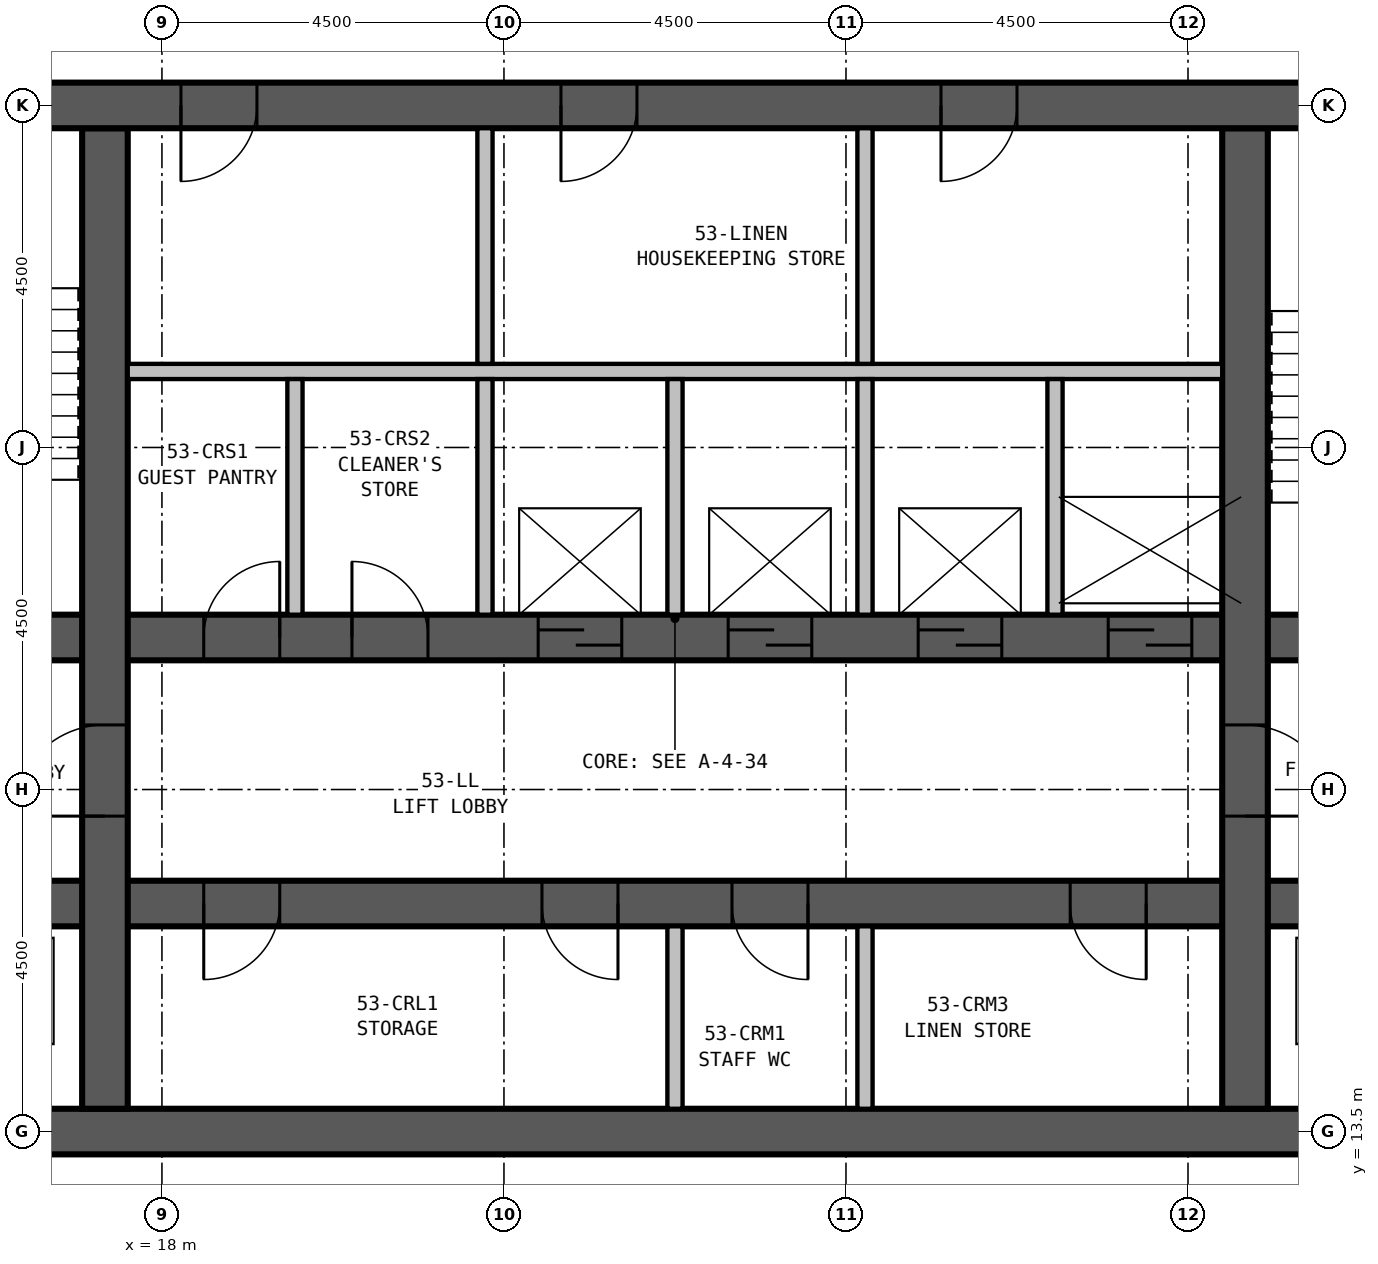
"""IFC4 building model, lengths in metres.
Left out: names, types, materials, properties, quantities, classifications, styles, units other than length and angle.
Written with IfcOpenShell. Run it as: python <this file> out.ifc"""

import sys

from ifc_helpers import new_model, si_unit, direction, frame, frame_2d, origin, place, context, subcontext, project, spatial, rectangle, extrude, element, fill, save


model = new_model("IFC4")
c1 = context("Model", 3, precision=1e-05, world=origin(), true_north=direction((0.0, 1.0)))
c2 = subcontext(c1, "Body", "Model", "MODEL_VIEW")
j1 = project(units=[si_unit("LENGTHUNIT", "METRE"), si_unit("PLANEANGLEUNIT", "RADIAN")], contexts=[c1])
p1 = place(None, origin())
s1 = spatial("IfcSite", under=j1, at=p1, CompositionType="ELEMENT")
p2 = place(p1, origin())
s2 = spatial("IfcBuilding", under=s1, at=p2, CompositionType="ELEMENT")
p3 = place(p2, frame((0.0, 0.0, 204.4)))
s3 = spatial("IfcBuildingStorey", under=s2, at=p3, CompositionType="ELEMENT", Elevation=204.4)
p4 = place(p3, frame((13.2, 13.5, 0.0), z_axis=(0.0, 0.0, 1.0), x_axis=(1.0, 0.0, 0.0)))
e1 = element("IfcWall", 1, at=p4, inside=s3, PredefinedType="SHEAR", context=c2, shape_type="SweptSolid", body=[
    extrude(rectangle(XDim=23.1, YDim=0.6, at=frame_2d((11.55, 0.0))), origin(), (0.0, 0.0, 1.0), 3.5),
])
p5 = place(p3, frame((36.3, 27.0, 0.0), z_axis=(0.0, 0.0, 1.0), x_axis=(-1.0, 0.0, 0.0)))
e2 = element("IfcWall", 2, at=p5, inside=s3, PredefinedType="SHEAR", context=c2, shape_type="SweptSolid", body=[
    extrude(rectangle(XDim=23.1, YDim=0.6, at=frame_2d((11.55, 0.0))), origin(), (0.0, 0.0, 1.0), 3.5),
])
p6 = place(p5, frame((17.05, 0.0, 0.0)))
e3 = element("IfcOpeningElement", 3, at=p6, cuts=e2, PredefinedType="OPENING", context=c2, shape_type="SweptSolid", body=[
    extrude(rectangle(XDim=1.0, YDim=2.1, at=frame_2d((0.5, 1.05))), frame((0.0, 0.31, 0.0), z_axis=(0.0, -1.0, 0.0), x_axis=(1.0, 0.0, 0.0)), (0.0, 0.0, 1.0), 0.62),
])
p7 = place(p5, frame((12.05, 0.0, 0.0)))
e4 = element("IfcOpeningElement", 4, at=p7, cuts=e2, PredefinedType="OPENING", context=c2, shape_type="SweptSolid", body=[
    extrude(rectangle(XDim=1.0, YDim=2.1, at=frame_2d((0.5, 1.05))), frame((0.0, 0.31, 0.0), z_axis=(0.0, -1.0, 0.0), x_axis=(1.0, 0.0, 0.0)), (0.0, 0.0, 1.0), 0.62),
])
p8 = place(p5, frame((7.05, 0.0, 0.0)))
e5 = element("IfcOpeningElement", 5, at=p8, cuts=e2, PredefinedType="OPENING", context=c2, shape_type="SweptSolid", body=[
    extrude(rectangle(XDim=1.0, YDim=2.1, at=frame_2d((0.5, 1.05))), frame((0.0, 0.31, 0.0), z_axis=(0.0, -1.0, 0.0), x_axis=(1.0, 0.0, 0.0)), (0.0, 0.0, 1.0), 0.62),
])
p9 = place(p3, frame((17.25, 13.8, 0.0), z_axis=(0.0, 0.0, 1.0), x_axis=(0.0, 1.0, 0.0)))
e6 = element("IfcWall", 6, at=p9, inside=s3, PredefinedType="SHEAR", context=c2, shape_type="SweptSolid", body=[
    extrude(rectangle(XDim=12.9, YDim=0.6, at=frame_2d((6.45, 0.0))), origin(), (0.0, 0.0, 1.0), 3.5),
])
p10 = place(p9, frame((3.85, 0.0, 0.0)))
e7 = element("IfcOpeningElement", 7, at=p10, cuts=e6, PredefinedType="OPENING", context=c2, shape_type="SweptSolid", body=[
    extrude(rectangle(XDim=1.2, YDim=2.1, at=frame_2d((0.6, 1.05))), frame((0.0, 0.31, 0.0), z_axis=(0.0, -1.0, 0.0), x_axis=(1.0, 0.0, 0.0)), (0.0, 0.0, 1.0), 0.62),
])
p11 = place(p3, frame((32.25, 13.8, 0.0), z_axis=(0.0, 0.0, 1.0), x_axis=(0.0, 1.0, 0.0)))
e8 = element("IfcWall", 8, at=p11, inside=s3, PredefinedType="SHEAR", context=c2, shape_type="SweptSolid", body=[
    extrude(rectangle(XDim=12.9, YDim=0.6, at=frame_2d((6.45, 0.0))), origin(), (0.0, 0.0, 1.0), 3.5),
])
p12 = place(p11, frame((5.05, 0.0, 0.0), z_axis=(0.0, 0.0, 1.0), x_axis=(-1.0, 0.0, 0.0)))
e9 = element("IfcOpeningElement", 9, at=p12, cuts=e8, PredefinedType="OPENING", context=c2, shape_type="SweptSolid", body=[
    extrude(rectangle(XDim=1.2, YDim=2.1, at=frame_2d((0.6, 1.05))), frame((0.0, 0.31, 0.0), z_axis=(0.0, -1.0, 0.0), x_axis=(1.0, 0.0, 0.0)), (0.0, 0.0, 1.0), 0.62),
])
p13 = place(p3, frame((13.8, 16.5, 0.0), z_axis=(0.0, 0.0, 1.0), x_axis=(1.0, 0.0, 0.0)))
e10 = element("IfcWall", 10, at=p13, inside=s3, PredefinedType="SHEAR", context=c2, shape_type="SweptSolid", body=[
    extrude(rectangle(XDim=21.9, YDim=0.6, at=frame_2d((10.95, 0.0))), origin(), (0.0, 0.0, 1.0), 3.5),
])
p14 = place(p13, frame((5.75, 0.0, 0.0), z_axis=(0.0, 0.0, 1.0), x_axis=(-1.0, 0.0, 0.0)))
e11 = element("IfcOpeningElement", 11, at=p14, cuts=e10, PredefinedType="OPENING", context=c2, shape_type="SweptSolid", body=[
    extrude(rectangle(XDim=1.0, YDim=2.1, at=frame_2d((0.5, 1.05))), frame((0.0, 0.31, 0.0), z_axis=(0.0, -1.0, 0.0), x_axis=(1.0, 0.0, 0.0)), (0.0, 0.0, 1.0), 0.62),
])
p15 = place(p13, frame((10.2, 0.0, 0.0), z_axis=(0.0, 0.0, 1.0), x_axis=(-1.0, 0.0, 0.0)))
e12 = element("IfcOpeningElement", 12, at=p15, cuts=e10, PredefinedType="OPENING", context=c2, shape_type="SweptSolid", body=[
    extrude(rectangle(XDim=1.0, YDim=2.1, at=frame_2d((0.5, 1.05))), frame((0.0, 0.31, 0.0), z_axis=(0.0, -1.0, 0.0), x_axis=(1.0, 0.0, 0.0)), (0.0, 0.0, 1.0), 0.62),
])
p16 = place(p13, frame((12.7, 0.0, 0.0), z_axis=(0.0, 0.0, 1.0), x_axis=(-1.0, 0.0, 0.0)))
e13 = element("IfcOpeningElement", 13, at=p16, cuts=e10, PredefinedType="OPENING", context=c2, shape_type="SweptSolid", body=[
    extrude(rectangle(XDim=1.0, YDim=2.1, at=frame_2d((0.5, 1.05))), frame((0.0, 0.31, 0.0), z_axis=(0.0, -1.0, 0.0), x_axis=(1.0, 0.0, 0.0)), (0.0, 0.0, 1.0), 0.62),
])
p17 = place(p13, frame((17.15, 0.0, 0.0), z_axis=(0.0, 0.0, 1.0), x_axis=(-1.0, 0.0, 0.0)))
e14 = element("IfcOpeningElement", 14, at=p17, cuts=e10, PredefinedType="OPENING", context=c2, shape_type="SweptSolid", body=[
    extrude(rectangle(XDim=1.0, YDim=2.1, at=frame_2d((0.5, 1.05))), frame((0.0, 0.31, 0.0), z_axis=(0.0, -1.0, 0.0), x_axis=(1.0, 0.0, 0.0)), (0.0, 0.0, 1.0), 0.62),
])
p18 = place(p13, frame((0.6, 0.0, 0.0)))
e15 = element("IfcOpeningElement", 15, at=p18, cuts=e10, PredefinedType="OPENING", context=c2, shape_type="SweptSolid", body=[
    extrude(rectangle(XDim=1.2, YDim=2.1, at=frame_2d((0.6, 1.05))), frame((0.0, 0.31, 0.0), z_axis=(0.0, -1.0, 0.0), x_axis=(1.0, 0.0, 0.0)), (0.0, 0.0, 1.0), 0.62),
])
p19 = place(p13, frame((19.6, 0.0, 0.0)))
e16 = element("IfcOpeningElement", 16, at=p19, cuts=e10, PredefinedType="OPENING", context=c2, shape_type="SweptSolid", body=[
    extrude(rectangle(XDim=1.2, YDim=2.1, at=frame_2d((0.6, 1.05))), frame((0.0, 0.31, 0.0), z_axis=(0.0, -1.0, 0.0), x_axis=(1.0, 0.0, 0.0)), (0.0, 0.0, 1.0), 0.62),
])
p20 = place(p3, frame((13.8, 20.0, 0.0), z_axis=(0.0, 0.0, 1.0), x_axis=(1.0, 0.0, 0.0)))
e17 = element("IfcWall", 17, at=p20, inside=s3, PredefinedType="SHEAR", context=c2, shape_type="SweptSolid", body=[
    extrude(rectangle(XDim=21.9, YDim=0.6, at=frame_2d((10.95, 0.0))), origin(), (0.0, 0.0, 1.0), 3.5),
])
p21 = place(p20, frame((0.5, 0.0, 0.0)))
e18 = element("IfcOpeningElement", 18, at=p21, cuts=e17, PredefinedType="OPENING", context=c2, shape_type="SweptSolid", body=[
    extrude(rectangle(XDim=1.0, YDim=2.1, at=frame_2d((0.5, 1.05))), frame((0.0, 0.31, 0.0), z_axis=(0.0, -1.0, 0.0), x_axis=(1.0, 0.0, 0.0)), (0.0, 0.0, 1.0), 0.62),
])
p22 = place(p20, frame((20.5, 0.0, 0.0)))
e19 = element("IfcOpeningElement", 19, at=p22, cuts=e17, PredefinedType="OPENING", context=c2, shape_type="SweptSolid", body=[
    extrude(rectangle(XDim=1.0, YDim=2.1, at=frame_2d((0.5, 1.05))), frame((0.0, 0.31, 0.0), z_axis=(0.0, -1.0, 0.0), x_axis=(1.0, 0.0, 0.0)), (0.0, 0.0, 1.0), 0.62),
])
p23 = place(p20, frame((9.15, 0.0, 0.0)))
e20 = element("IfcOpeningElement", 20, at=p23, cuts=e17, PredefinedType="OPENING", context=c2, shape_type="SweptSolid", body=[
    extrude(rectangle(XDim=1.1, YDim=2.1, at=frame_2d((0.55, 1.05))), frame((0.0, 0.31, 0.0), z_axis=(0.0, -1.0, 0.0), x_axis=(1.0, 0.0, 0.0)), (0.0, 0.0, 1.0), 0.62),
])
p24 = place(p20, frame((11.65, 0.0, 0.0)))
e21 = element("IfcOpeningElement", 21, at=p24, cuts=e17, PredefinedType="OPENING", context=c2, shape_type="SweptSolid", body=[
    extrude(rectangle(XDim=1.1, YDim=2.1, at=frame_2d((0.55, 1.05))), frame((0.0, 0.31, 0.0), z_axis=(0.0, -1.0, 0.0), x_axis=(1.0, 0.0, 0.0)), (0.0, 0.0, 1.0), 0.62),
])
p25 = place(p20, frame((14.15, 0.0, 0.0)))
e22 = element("IfcOpeningElement", 22, at=p25, cuts=e17, PredefinedType="OPENING", context=c2, shape_type="SweptSolid", body=[
    extrude(rectangle(XDim=1.1, YDim=2.1, at=frame_2d((0.55, 1.05))), frame((0.0, 0.31, 0.0), z_axis=(0.0, -1.0, 0.0), x_axis=(1.0, 0.0, 0.0)), (0.0, 0.0, 1.0), 0.62),
])
p26 = place(p20, frame((16.65, 0.0, 0.0)))
e23 = element("IfcOpeningElement", 23, at=p26, cuts=e17, PredefinedType="OPENING", context=c2, shape_type="SweptSolid", body=[
    extrude(rectangle(XDim=1.1, YDim=2.1, at=frame_2d((0.55, 1.05))), frame((0.0, 0.31, 0.0), z_axis=(0.0, -1.0, 0.0), x_axis=(1.0, 0.0, 0.0)), (0.0, 0.0, 1.0), 0.62),
])
p27 = place(p20, frame((4.75, 0.0, 0.0)))
e24 = element("IfcOpeningElement", 24, at=p27, cuts=e17, PredefinedType="OPENING", context=c2, shape_type="SweptSolid", body=[
    extrude(rectangle(XDim=1.0, YDim=2.1, at=frame_2d((0.5, 1.05))), frame((0.0, 0.31, 0.0), z_axis=(0.0, -1.0, 0.0), x_axis=(1.0, 0.0, 0.0)), (0.0, 0.0, 1.0), 0.62),
])
p28 = place(p20, frame((6.7, 0.0, 0.0)))
e25 = element("IfcOpeningElement", 25, at=p28, cuts=e17, PredefinedType="OPENING", context=c2, shape_type="SweptSolid", body=[
    extrude(rectangle(XDim=1.0, YDim=2.1, at=frame_2d((0.5, 1.05))), frame((0.0, 0.31, 0.0), z_axis=(0.0, -1.0, 0.0), x_axis=(1.0, 0.0, 0.0)), (0.0, 0.0, 1.0), 0.62),
])
for number, where, z_axis, x_axis in (
    (26, (19.75, 20.3, 0.0), (0.0, 0.0, 1.0), (0.0, 1.0, 0.0)),
    (27, (22.25, 20.3, 0.0), (0.0, 0.0, 1.0), (0.0, 1.0, 0.0)),
):
    element("IfcWall", number, at=place(p3, frame(where, z_axis=z_axis, x_axis=x_axis)), inside=s3, PredefinedType="PARTITIONING", context=c2, shape_type="SweptSolid", body=[
        extrude(rectangle(XDim=3.1, YDim=0.2, at=frame_2d((1.55, 0.0))), origin(), (0.0, 0.0, 1.0), 3.25),
    ])
p29 = place(p3, frame((24.75, 13.8, 0.0), z_axis=(0.0, 0.0, 1.0), x_axis=(0.0, 1.0, 0.0)))
e28 = element("IfcWall", 28, at=p29, inside=s3, PredefinedType="PARTITIONING", context=c2, shape_type="SweptSolid", body=[
    extrude(rectangle(XDim=2.4, YDim=0.2, at=frame_2d((1.2, 0.0))), origin(), (0.0, 0.0, 1.0), 3.25),
])
p30 = place(p3, frame((24.75, 20.3, 0.0), z_axis=(0.0, 0.0, 1.0), x_axis=(0.0, 1.0, 0.0)))
e29 = element("IfcWall", 29, at=p30, inside=s3, PredefinedType="PARTITIONING", context=c2, shape_type="SweptSolid", body=[
    extrude(rectangle(XDim=3.1, YDim=0.2, at=frame_2d((1.55, 0.0))), origin(), (0.0, 0.0, 1.0), 3.25),
])
p31 = place(p3, frame((27.25, 13.8, 0.0), z_axis=(0.0, 0.0, 1.0), x_axis=(0.0, 1.0, 0.0)))
e30 = element("IfcWall", 30, at=p31, inside=s3, PredefinedType="PARTITIONING", context=c2, shape_type="SweptSolid", body=[
    extrude(rectangle(XDim=2.4, YDim=0.2, at=frame_2d((1.2, 0.0))), origin(), (0.0, 0.0, 1.0), 3.25),
])
for number, where, z_axis, x_axis in (
    (31, (27.25, 20.3, 0.0), (0.0, 0.0, 1.0), (0.0, 1.0, 0.0)),
    (32, (29.75, 20.3, 0.0), (0.0, 0.0, 1.0), (0.0, 1.0, 0.0)),
):
    element("IfcWall", number, at=place(p3, frame(where, z_axis=z_axis, x_axis=x_axis)), inside=s3, PredefinedType="PARTITIONING", context=c2, shape_type="SweptSolid", body=[
        extrude(rectangle(XDim=3.1, YDim=0.2, at=frame_2d((1.55, 0.0))), origin(), (0.0, 0.0, 1.0), 3.25),
    ])
p32 = place(p3, frame((17.55, 23.5, 0.0), z_axis=(0.0, 0.0, 1.0), x_axis=(1.0, 0.0, 0.0)))
e33 = element("IfcWall", 33, at=p32, inside=s3, PredefinedType="PARTITIONING", context=c2, shape_type="SweptSolid", body=[
    extrude(rectangle(XDim=14.4, YDim=0.2, at=frame_2d((7.2, 0.0))), origin(), (0.0, 0.0, 1.0), 3.25),
])
for number, where, z_axis, x_axis in (
    (34, (22.25, 23.6, 0.0), (0.0, 0.0, 1.0), (0.0, 1.0, 0.0)),
    (35, (27.25, 23.6, 0.0), (0.0, 0.0, 1.0), (0.0, 1.0, 0.0)),
):
    element("IfcWall", number, at=place(p3, frame(where, z_axis=z_axis, x_axis=x_axis)), inside=s3, PredefinedType="PARTITIONING", context=c2, shape_type="SweptSolid", body=[
        extrude(rectangle(XDim=3.1, YDim=0.2, at=frame_2d((1.55, 0.0))), origin(), (0.0, 0.0, 1.0), 3.25),
    ])
p33 = place(p10, origin())
e36 = element("IfcDoor", 36, at=p33, inside=s3, OperationType="SINGLE_SWING_LEFT", PredefinedType="DOOR", context=c2, shape_type="SweptSolid", body=[
    extrude(rectangle(XDim=1.2, YDim=2.1, at=frame_2d((0.6, 1.05))), frame((0.0, 0.3, 0.0), z_axis=(0.0, -1.0, 0.0), x_axis=(1.0, 0.0, 0.0)), (0.0, 0.0, 1.0), 0.6),
])
fill(e7, e36)
p34 = place(p12, origin())
e37 = element("IfcDoor", 37, at=p34, inside=s3, OperationType="SINGLE_SWING_RIGHT", PredefinedType="DOOR", context=c2, shape_type="SweptSolid", body=[
    extrude(rectangle(XDim=1.2, YDim=2.1, at=frame_2d((0.6, 1.05))), frame((0.0, 0.3, 0.0), z_axis=(0.0, -1.0, 0.0), x_axis=(1.0, 0.0, 0.0)), (0.0, 0.0, 1.0), 0.6),
])
fill(e9, e37)
p35 = place(p23, origin())
e38 = element("IfcDoor", 38, at=p35, inside=s3, OperationType="SLIDING_TO_LEFT", PredefinedType="DOOR", context=c2, shape_type="SweptSolid", body=[
    extrude(rectangle(XDim=1.1, YDim=2.1, at=frame_2d((0.55, 1.05))), frame((0.0, 0.3, 0.0), z_axis=(0.0, -1.0, 0.0), x_axis=(1.0, 0.0, 0.0)), (0.0, 0.0, 1.0), 0.6),
])
fill(e20, e38)
p36 = place(p24, origin())
e39 = element("IfcDoor", 39, at=p36, inside=s3, OperationType="SLIDING_TO_LEFT", PredefinedType="DOOR", context=c2, shape_type="SweptSolid", body=[
    extrude(rectangle(XDim=1.1, YDim=2.1, at=frame_2d((0.55, 1.05))), frame((0.0, 0.3, 0.0), z_axis=(0.0, -1.0, 0.0), x_axis=(1.0, 0.0, 0.0)), (0.0, 0.0, 1.0), 0.6),
])
fill(e21, e39)
p37 = place(p25, origin())
e40 = element("IfcDoor", 40, at=p37, inside=s3, OperationType="SLIDING_TO_LEFT", PredefinedType="DOOR", context=c2, shape_type="SweptSolid", body=[
    extrude(rectangle(XDim=1.1, YDim=2.1, at=frame_2d((0.55, 1.05))), frame((0.0, 0.3, 0.0), z_axis=(0.0, -1.0, 0.0), x_axis=(1.0, 0.0, 0.0)), (0.0, 0.0, 1.0), 0.6),
])
fill(e22, e40)
p38 = place(p26, origin())
e41 = element("IfcDoor", 41, at=p38, inside=s3, OperationType="SLIDING_TO_LEFT", PredefinedType="DOOR", context=c2, shape_type="SweptSolid", body=[
    extrude(rectangle(XDim=1.1, YDim=2.1, at=frame_2d((0.55, 1.05))), frame((0.0, 0.3, 0.0), z_axis=(0.0, -1.0, 0.0), x_axis=(1.0, 0.0, 0.0)), (0.0, 0.0, 1.0), 0.6),
])
fill(e23, e41)
p39 = place(p14, origin())
e42 = element("IfcDoor", 42, at=p39, inside=s3, OperationType="SINGLE_SWING_RIGHT", PredefinedType="DOOR", context=c2, shape_type="SweptSolid", body=[
    extrude(rectangle(XDim=1.0, YDim=2.1, at=frame_2d((0.5, 1.05))), frame((0.0, 0.3, 0.0), z_axis=(0.0, -1.0, 0.0), x_axis=(1.0, 0.0, 0.0)), (0.0, 0.0, 1.0), 0.6),
])
fill(e11, e42)
p40 = place(p15, origin())
e43 = element("IfcDoor", 43, at=p40, inside=s3, OperationType="SINGLE_SWING_LEFT", PredefinedType="DOOR", context=c2, shape_type="SweptSolid", body=[
    extrude(rectangle(XDim=1.0, YDim=2.1, at=frame_2d((0.5, 1.05))), frame((0.0, 0.3, 0.0), z_axis=(0.0, -1.0, 0.0), x_axis=(1.0, 0.0, 0.0)), (0.0, 0.0, 1.0), 0.6),
])
fill(e12, e43)
p41 = place(p16, origin())
e44 = element("IfcDoor", 44, at=p41, inside=s3, OperationType="SINGLE_SWING_LEFT", PredefinedType="DOOR", context=c2, shape_type="SweptSolid", body=[
    extrude(rectangle(XDim=1.0, YDim=2.1, at=frame_2d((0.5, 1.05))), frame((0.0, 0.3, 0.0), z_axis=(0.0, -1.0, 0.0), x_axis=(1.0, 0.0, 0.0)), (0.0, 0.0, 1.0), 0.6),
])
fill(e13, e44)
p42 = place(p17, origin())
e45 = element("IfcDoor", 45, at=p42, inside=s3, OperationType="SINGLE_SWING_LEFT", PredefinedType="DOOR", context=c2, shape_type="SweptSolid", body=[
    extrude(rectangle(XDim=1.0, YDim=2.1, at=frame_2d((0.5, 1.05))), frame((0.0, 0.3, 0.0), z_axis=(0.0, -1.0, 0.0), x_axis=(1.0, 0.0, 0.0)), (0.0, 0.0, 1.0), 0.6),
])
fill(e14, e45)
p43 = place(p27, origin())
e46 = element("IfcDoor", 46, at=p43, inside=s3, OperationType="SINGLE_SWING_RIGHT", PredefinedType="DOOR", context=c2, shape_type="SweptSolid", body=[
    extrude(rectangle(XDim=1.0, YDim=2.1, at=frame_2d((0.5, 1.05))), frame((0.0, 0.3, 0.0), z_axis=(0.0, -1.0, 0.0), x_axis=(1.0, 0.0, 0.0)), (0.0, 0.0, 1.0), 0.6),
])
fill(e24, e46)
p44 = place(p28, origin())
e47 = element("IfcDoor", 47, at=p44, inside=s3, OperationType="SINGLE_SWING_LEFT", PredefinedType="DOOR", context=c2, shape_type="SweptSolid", body=[
    extrude(rectangle(XDim=1.0, YDim=2.1, at=frame_2d((0.5, 1.05))), frame((0.0, 0.3, 0.0), z_axis=(0.0, -1.0, 0.0), x_axis=(1.0, 0.0, 0.0)), (0.0, 0.0, 1.0), 0.6),
])
fill(e25, e47)
p45 = place(p6, origin())
e48 = element("IfcDoor", 48, at=p45, inside=s3, OperationType="SINGLE_SWING_RIGHT", PredefinedType="DOOR", context=c2, shape_type="SweptSolid", body=[
    extrude(rectangle(XDim=1.0, YDim=2.1, at=frame_2d((0.5, 1.05))), frame((0.0, 0.3, 0.0), z_axis=(0.0, -1.0, 0.0), x_axis=(1.0, 0.0, 0.0)), (0.0, 0.0, 1.0), 0.6),
])
fill(e3, e48)
p46 = place(p7, origin())
e49 = element("IfcDoor", 49, at=p46, inside=s3, OperationType="SINGLE_SWING_RIGHT", PredefinedType="DOOR", context=c2, shape_type="SweptSolid", body=[
    extrude(rectangle(XDim=1.0, YDim=2.1, at=frame_2d((0.5, 1.05))), frame((0.0, 0.3, 0.0), z_axis=(0.0, -1.0, 0.0), x_axis=(1.0, 0.0, 0.0)), (0.0, 0.0, 1.0), 0.6),
])
fill(e4, e49)
p47 = place(p8, origin())
e50 = element("IfcDoor", 50, at=p47, inside=s3, OperationType="SINGLE_SWING_RIGHT", PredefinedType="DOOR", context=c2, shape_type="SweptSolid", body=[
    extrude(rectangle(XDim=1.0, YDim=2.1, at=frame_2d((0.5, 1.05))), frame((0.0, 0.3, 0.0), z_axis=(0.0, -1.0, 0.0), x_axis=(1.0, 0.0, 0.0)), (0.0, 0.0, 1.0), 0.6),
])
fill(e5, e50)
save(model, sys.argv[1])
